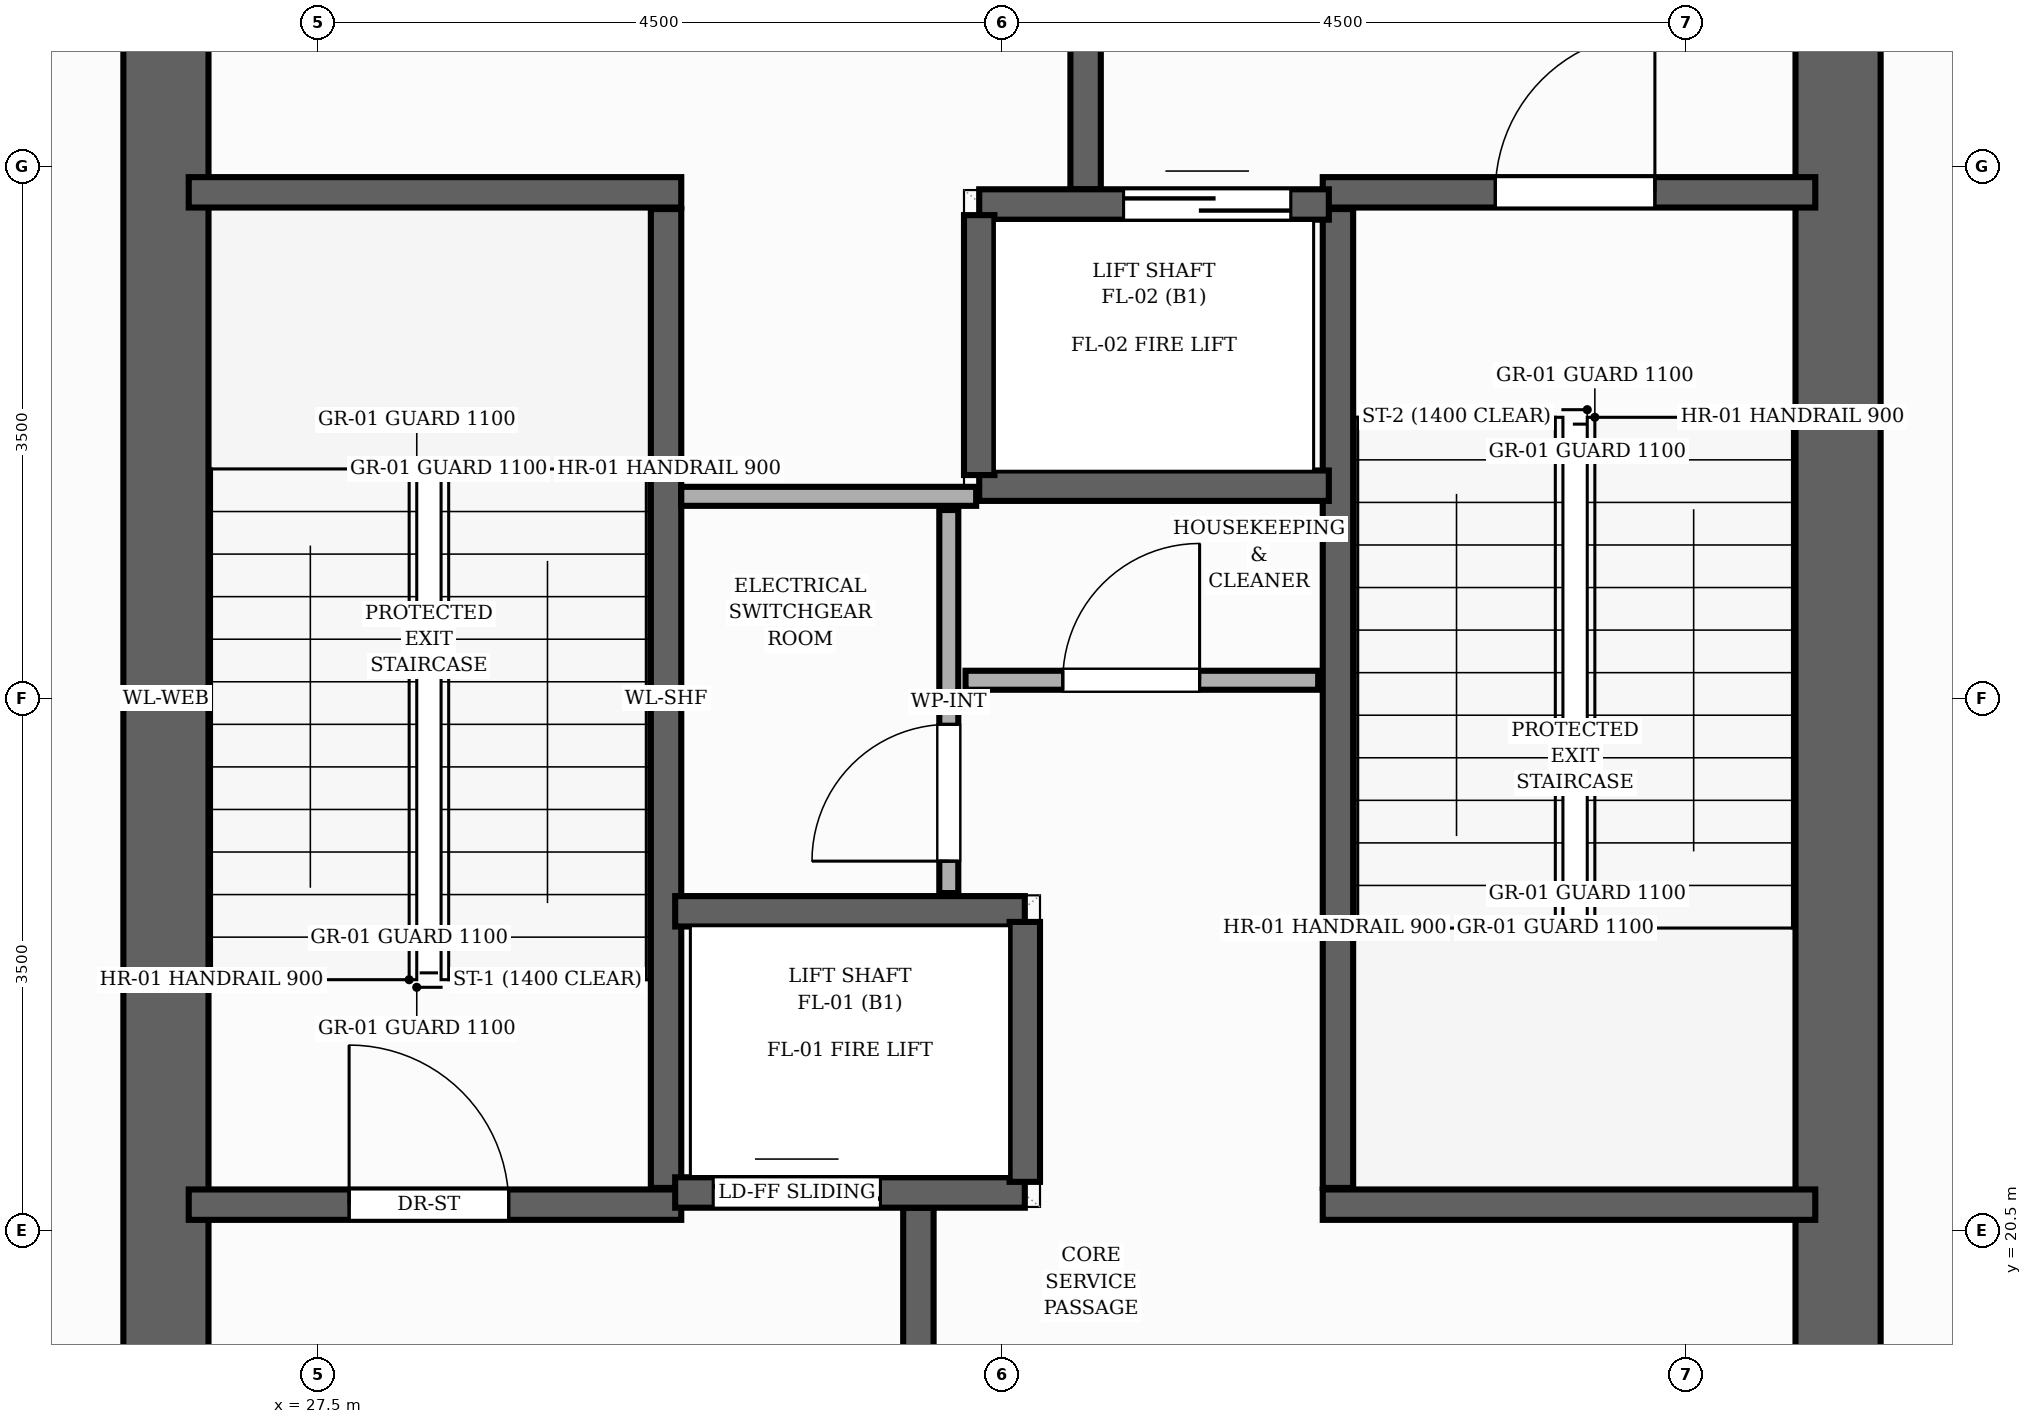
"""IFC4 building model, lengths in metres.
Left out: names, types, materials, properties, quantities, classifications, styles, units other than length and angle.
Written with IfcOpenShell. Run it as: python <this file> out.ifc"""

import sys

from ifc_helpers import new_model, si_unit, direction, frame, frame_2d, origin, place, context, subcontext, project, spatial, rectangle, extrude, element, fill, save


model = new_model("IFC4")
c1 = context("Model", 3, precision=1e-05, world=origin(), true_north=direction((0.0, 1.0)))
c2 = subcontext(c1, "Body", "Model", "MODEL_VIEW")
j1 = project(units=[si_unit("LENGTHUNIT", "METRE"), si_unit("PLANEANGLEUNIT", "RADIAN")], contexts=[c1])
p1 = place(None, origin())
s1 = spatial("IfcSite", under=j1, at=p1, CompositionType="ELEMENT")
p2 = place(p1, origin())
s2 = spatial("IfcBuilding", under=s1, at=p2, CompositionType="ELEMENT")
p3 = place(p2, frame((0.0, 0.0, -9.0)))
s3 = spatial("IfcBuildingStorey", under=s2, at=p3, CompositionType="ELEMENT", Elevation=-9.0)
for number, where, z_axis, x_axis in (
    (1, (26.5, 17.4, 0.0), (0.0, 0.0, 1.0), (0.0, 1.0, 0.0)),
    (2, (37.5, 17.4, 0.0), (0.0, 0.0, 1.0), (0.0, 1.0, 0.0)),
):
    element("IfcWall", number, at=place(p3, frame(where, z_axis=z_axis, x_axis=x_axis)), inside=s3, PredefinedType="SHEAR", context=c2, shape_type="SweptSolid", body=[
        extrude(rectangle(XDim=13.2, YDim=0.56, at=frame_2d((6.6, 0.0))), origin(), (0.0, 0.0, 1.0), 4.5),
    ])
p4 = place(p3, frame((29.79, 20.78, 0.0), z_axis=(0.0, 0.0, 1.0), x_axis=(0.0, 1.0, 0.0)))
e3 = element("IfcWall", 3, at=p4, inside=s3, PredefinedType="SHEAR", context=c2, shape_type="SweptSolid", body=[
    extrude(rectangle(XDim=6.44, YDim=0.2, at=frame_2d((3.22, 0.0))), origin(), (0.0, 0.0, 1.0), 4.5),
])
p5 = place(p3, frame((26.65, 27.33, 0.0), z_axis=(0.0, 0.0, 1.0), x_axis=(1.0, 0.0, 0.0)))
e4 = element("IfcWall", 4, at=p5, inside=s3, PredefinedType="SHEAR", context=c2, shape_type="SweptSolid", body=[
    extrude(rectangle(XDim=3.24, YDim=0.2, at=frame_2d((1.62, 0.0))), origin(), (0.0, 0.0, 1.0), 4.5),
])
p6 = place(p3, frame((26.65, 20.67, 0.0), z_axis=(0.0, 0.0, 1.0), x_axis=(1.0, 0.0, 0.0)))
e5 = element("IfcWall", 5, at=p6, inside=s3, PredefinedType="SHEAR", context=c2, shape_type="SweptSolid", body=[
    extrude(rectangle(XDim=3.24, YDim=0.2, at=frame_2d((1.62, 0.0))), origin(), (0.0, 0.0, 1.0), 4.5),
])
p7 = place(p6, frame((1.055, 0.0, 0.0)))
e6 = element("IfcOpeningElement", 6, at=p7, cuts=e5, PredefinedType="OPENING", context=c2, shape_type="SweptSolid", body=[
    extrude(rectangle(XDim=1.05, YDim=2.15, at=frame_2d((0.525, 1.075))), frame((0.0, 0.11, 0.0), z_axis=(0.0, -1.0, 0.0), x_axis=(1.0, 0.0, 0.0)), (0.0, 0.0, 1.0), 0.22),
])
p8 = place(p3, frame((34.21, 20.78, 0.0), z_axis=(0.0, 0.0, 1.0), x_axis=(0.0, 1.0, 0.0)))
e7 = element("IfcWall", 7, at=p8, inside=s3, PredefinedType="SHEAR", context=c2, shape_type="SweptSolid", body=[
    extrude(rectangle(XDim=6.44, YDim=0.2, at=frame_2d((3.22, 0.0))), origin(), (0.0, 0.0, 1.0), 4.5),
])
p9 = place(p3, frame((34.11, 20.67, 0.0), z_axis=(0.0, 0.0, 1.0), x_axis=(1.0, 0.0, 0.0)))
e8 = element("IfcWall", 8, at=p9, inside=s3, PredefinedType="SHEAR", context=c2, shape_type="SweptSolid", body=[
    extrude(rectangle(XDim=3.24, YDim=0.2, at=frame_2d((1.62, 0.0))), origin(), (0.0, 0.0, 1.0), 4.5),
])
p10 = place(p3, frame((34.11, 27.33, 0.0), z_axis=(0.0, 0.0, 1.0), x_axis=(1.0, 0.0, 0.0)))
e9 = element("IfcWall", 9, at=p10, inside=s3, PredefinedType="SHEAR", context=c2, shape_type="SweptSolid", body=[
    extrude(rectangle(XDim=3.24, YDim=0.2, at=frame_2d((1.62, 0.0))), origin(), (0.0, 0.0, 1.0), 4.5),
])
p11 = place(p10, frame((1.135, 0.0, 0.0)))
e10 = element("IfcOpeningElement", 10, at=p11, cuts=e9, PredefinedType="OPENING", context=c2, shape_type="SweptSolid", body=[
    extrude(rectangle(XDim=1.05, YDim=2.15, at=frame_2d((0.525, 1.075))), frame((0.0, 0.11, 0.0), z_axis=(0.0, -1.0, 0.0), x_axis=(1.0, 0.0, 0.0)), (0.0, 0.0, 1.0), 0.22),
])
p12 = place(p3, frame((31.45, 17.15, 0.0), z_axis=(0.0, 0.0, 1.0), x_axis=(0.0, 1.0, 0.0)))
e11 = element("IfcWall", 11, at=p12, inside=s3, PredefinedType="SHEAR", context=c2, shape_type="SweptSolid", body=[
    extrude(rectangle(XDim=3.5, YDim=0.2, at=frame_2d((1.75, 0.0))), origin(), (0.0, 0.0, 1.0), 4.5),
])
p13 = place(p12, frame((1.25, 0.0, 0.0)))
e12 = element("IfcOpeningElement", 12, at=p13, cuts=e11, PredefinedType="OPENING", context=c2, shape_type="SweptSolid", body=[
    extrude(rectangle(XDim=0.9, YDim=2.1, at=frame_2d((0.45, 1.05))), frame((0.0, 0.11, 0.0), z_axis=(0.0, -1.0, 0.0), x_axis=(1.0, 0.0, 0.0)), (0.0, 0.0, 1.0), 0.22),
])
p14 = place(p3, frame((32.55, 27.35, 0.0), z_axis=(0.0, 0.0, 1.0), x_axis=(0.0, 1.0, 0.0)))
e13 = element("IfcWall", 13, at=p14, inside=s3, PredefinedType="SHEAR", context=c2, shape_type="SweptSolid", body=[
    extrude(rectangle(XDim=3.5, YDim=0.2, at=frame_2d((1.75, 0.0))), origin(), (0.0, 0.0, 1.0), 4.5),
])
p15 = place(p3, frame((29.85, 20.75, 0.0), z_axis=(0.0, 0.0, 1.0), x_axis=(1.0, 0.0, 0.0)))
e14 = element("IfcWall", 14, at=p15, inside=s3, PredefinedType="SHEAR", context=c2, shape_type="SweptSolid", body=[
    extrude(rectangle(XDim=2.3, YDim=0.2, at=frame_2d((1.15, 0.0))), origin(), (0.0, 0.0, 1.0), 4.5),
])
p16 = place(p15, frame((0.25, 0.0, 0.0)))
e15 = element("IfcOpeningElement", 15, at=p16, cuts=e14, PredefinedType="OPENING", context=c2, shape_type="SweptSolid", body=[
    extrude(rectangle(XDim=1.1, YDim=2.15, at=frame_2d((0.55, 1.075))), frame((0.0, 0.11, 0.0), z_axis=(0.0, -1.0, 0.0), x_axis=(1.0, 0.0, 0.0)), (0.0, 0.0, 1.0), 0.22),
])
p17 = place(p3, frame((29.85, 22.6, 0.0), z_axis=(0.0, 0.0, 1.0), x_axis=(1.0, 0.0, 0.0)))
e16 = element("IfcWall", 16, at=p17, inside=s3, PredefinedType="SHEAR", context=c2, shape_type="SweptSolid", body=[
    extrude(rectangle(XDim=2.3, YDim=0.2, at=frame_2d((1.15, 0.0))), origin(), (0.0, 0.0, 1.0), 4.5),
])
p18 = place(p3, frame((32.15, 20.82, 0.0), z_axis=(0.0, 0.0, 1.0), x_axis=(0.0, 1.0, 0.0)))
e17 = element("IfcWall", 17, at=p18, inside=s3, PredefinedType="SHEAR", context=c2, shape_type="SweptSolid", body=[
    extrude(rectangle(XDim=1.71, YDim=0.2, at=frame_2d((0.855, 0.0))), origin(), (0.0, 0.0, 1.0), 4.5),
])
p19 = place(p3, frame((31.85, 27.25, 0.0), z_axis=(0.0, 0.0, 1.0), x_axis=(1.0, 0.0, 0.0)))
e18 = element("IfcWall", 18, at=p19, inside=s3, PredefinedType="SHEAR", context=c2, shape_type="SweptSolid", body=[
    extrude(rectangle(XDim=2.3, YDim=0.2, at=frame_2d((1.15, 0.0))), origin(), (0.0, 0.0, 1.0), 4.5),
])
p20 = place(p19, frame((0.95, 0.0, 0.0)))
e19 = element("IfcOpeningElement", 19, at=p20, cuts=e18, PredefinedType="OPENING", context=c2, shape_type="SweptSolid", body=[
    extrude(rectangle(XDim=1.1, YDim=2.15, at=frame_2d((0.55, 1.075))), frame((0.0, 0.11, 0.0), z_axis=(0.0, -1.0, 0.0), x_axis=(1.0, 0.0, 0.0)), (0.0, 0.0, 1.0), 0.22),
])
p21 = place(p3, frame((31.85, 25.4, 0.0), z_axis=(0.0, 0.0, 1.0), x_axis=(1.0, 0.0, 0.0)))
e20 = element("IfcWall", 20, at=p21, inside=s3, PredefinedType="SHEAR", context=c2, shape_type="SweptSolid", body=[
    extrude(rectangle(XDim=2.3, YDim=0.2, at=frame_2d((1.15, 0.0))), origin(), (0.0, 0.0, 1.0), 4.5),
])
p22 = place(p3, frame((31.85, 25.47, 0.0), z_axis=(0.0, 0.0, 1.0), x_axis=(0.0, 1.0, 0.0)))
e21 = element("IfcWall", 21, at=p22, inside=s3, PredefinedType="SHEAR", context=c2, shape_type="SweptSolid", body=[
    extrude(rectangle(XDim=1.71, YDim=0.2, at=frame_2d((0.855, 0.0))), origin(), (0.0, 0.0, 1.0), 4.5),
])
p23 = place(p3, frame((31.65, 22.72, 0.0), z_axis=(0.0, 0.0, 1.0), x_axis=(0.0, 1.0, 0.0)))
e22 = element("IfcWall", 22, at=p23, inside=s3, PredefinedType="PARTITIONING", context=c2, shape_type="SweptSolid", body=[
    extrude(rectangle(XDim=2.52, YDim=0.125, at=frame_2d((1.26, 0.0))), origin(), (0.0, 0.0, 1.0), 4.195),
])
p24 = place(p23, frame((0.21, 0.0, 0.0)))
e23 = element("IfcOpeningElement", 23, at=p24, cuts=e22, PredefinedType="OPENING", context=c2, shape_type="SweptSolid", body=[
    extrude(rectangle(XDim=0.9, YDim=2.1, at=frame_2d((0.45, 1.05))), frame((0.0, 0.073, 0.0), z_axis=(0.0, -1.0, 0.0), x_axis=(1.0, 0.0, 0.0)), (0.0, 0.0, 1.0), 0.145),
])
p25 = place(p3, frame((31.76, 24.12, 0.0), z_axis=(0.0, 0.0, 1.0), x_axis=(1.0, 0.0, 0.0)))
e24 = element("IfcWall", 24, at=p25, inside=s3, PredefinedType="PARTITIONING", context=c2, shape_type="SweptSolid", body=[
    extrude(rectangle(XDim=2.32, YDim=0.125, at=frame_2d((1.16, 0.0))), origin(), (0.0, 0.0, 1.0), 4.195),
])
p26 = place(p25, frame((0.64, 0.0, 0.0)))
e25 = element("IfcOpeningElement", 25, at=p26, cuts=e24, PredefinedType="OPENING", context=c2, shape_type="SweptSolid", body=[
    extrude(rectangle(XDim=0.9, YDim=2.1, at=frame_2d((0.45, 1.05))), frame((0.0, 0.073, 0.0), z_axis=(0.0, -1.0, 0.0), x_axis=(1.0, 0.0, 0.0)), (0.0, 0.0, 1.0), 0.145),
])
p27 = place(p3, frame((29.89, 25.33, 0.0), z_axis=(0.0, 0.0, 1.0), x_axis=(1.0, 0.0, 0.0)))
e26 = element("IfcWall", 26, at=p27, inside=s3, PredefinedType="PARTITIONING", context=c2, shape_type="SweptSolid", body=[
    extrude(rectangle(XDim=1.94, YDim=0.125, at=frame_2d((0.97, 0.0))), origin(), (0.0, 0.0, 1.0), 4.195),
])
p28 = place(p7, origin())
e27 = element("IfcDoor", 27, at=p28, inside=s3, OperationType="SINGLE_SWING_LEFT", PredefinedType="DOOR", context=c2, shape_type="SweptSolid", body=[
    extrude(rectangle(XDim=1.05, YDim=2.15, at=frame_2d((0.525, 1.075))), frame((0.0, 0.025, 0.0), z_axis=(0.0, -1.0, 0.0), x_axis=(1.0, 0.0, 0.0)), (0.0, 0.0, 1.0), 0.05),
])
fill(e6, e27)
p29 = place(p11, origin())
e28 = element("IfcDoor", 28, at=p29, inside=s3, OperationType="SINGLE_SWING_RIGHT", PredefinedType="DOOR", context=c2, shape_type="SweptSolid", body=[
    extrude(rectangle(XDim=1.05, YDim=2.15, at=frame_2d((0.525, 1.075))), frame((0.0, 0.025, 0.0), z_axis=(0.0, -1.0, 0.0), x_axis=(1.0, 0.0, 0.0)), (0.0, 0.0, 1.0), 0.05),
])
fill(e10, e28)
p30 = place(p16, origin())
e29 = element("IfcDoor", 29, at=p30, inside=s3, OperationType="DOUBLE_DOOR_SLIDING", PredefinedType="DOOR", context=c2, shape_type="SweptSolid", body=[
    extrude(rectangle(XDim=1.1, YDim=2.15, at=frame_2d((0.55, 1.075))), frame((0.0, 0.025, 0.0), z_axis=(0.0, -1.0, 0.0), x_axis=(1.0, 0.0, 0.0)), (0.0, 0.0, 1.0), 0.05),
])
fill(e15, e29)
p31 = place(p20, origin())
e30 = element("IfcDoor", 30, at=p31, inside=s3, OperationType="DOUBLE_DOOR_SLIDING", PredefinedType="DOOR", context=c2, shape_type="SweptSolid", body=[
    extrude(rectangle(XDim=1.1, YDim=2.15, at=frame_2d((0.55, 1.075))), frame((0.0, 0.025, 0.0), z_axis=(0.0, -1.0, 0.0), x_axis=(1.0, 0.0, 0.0)), (0.0, 0.0, 1.0), 0.05),
])
fill(e19, e30)
p32 = place(p24, origin())
e31 = element("IfcDoor", 31, at=p32, inside=s3, OperationType="SINGLE_SWING_LEFT", PredefinedType="DOOR", context=c2, shape_type="SweptSolid", body=[
    extrude(rectangle(XDim=0.9, YDim=2.1, at=frame_2d((0.45, 1.05))), frame((0.0, 0.025, 0.0), z_axis=(0.0, -1.0, 0.0), x_axis=(1.0, 0.0, 0.0)), (0.0, 0.0, 1.0), 0.05),
])
fill(e23, e31)
p33 = place(p26, origin())
e32 = element("IfcDoor", 32, at=p33, inside=s3, OperationType="SINGLE_SWING_RIGHT", PredefinedType="DOOR", context=c2, shape_type="SweptSolid", body=[
    extrude(rectangle(XDim=0.9, YDim=2.1, at=frame_2d((0.45, 1.05))), frame((0.0, 0.025, 0.0), z_axis=(0.0, -1.0, 0.0), x_axis=(1.0, 0.0, 0.0)), (0.0, 0.0, 1.0), 0.05),
])
fill(e25, e32)
save(model, sys.argv[1])
